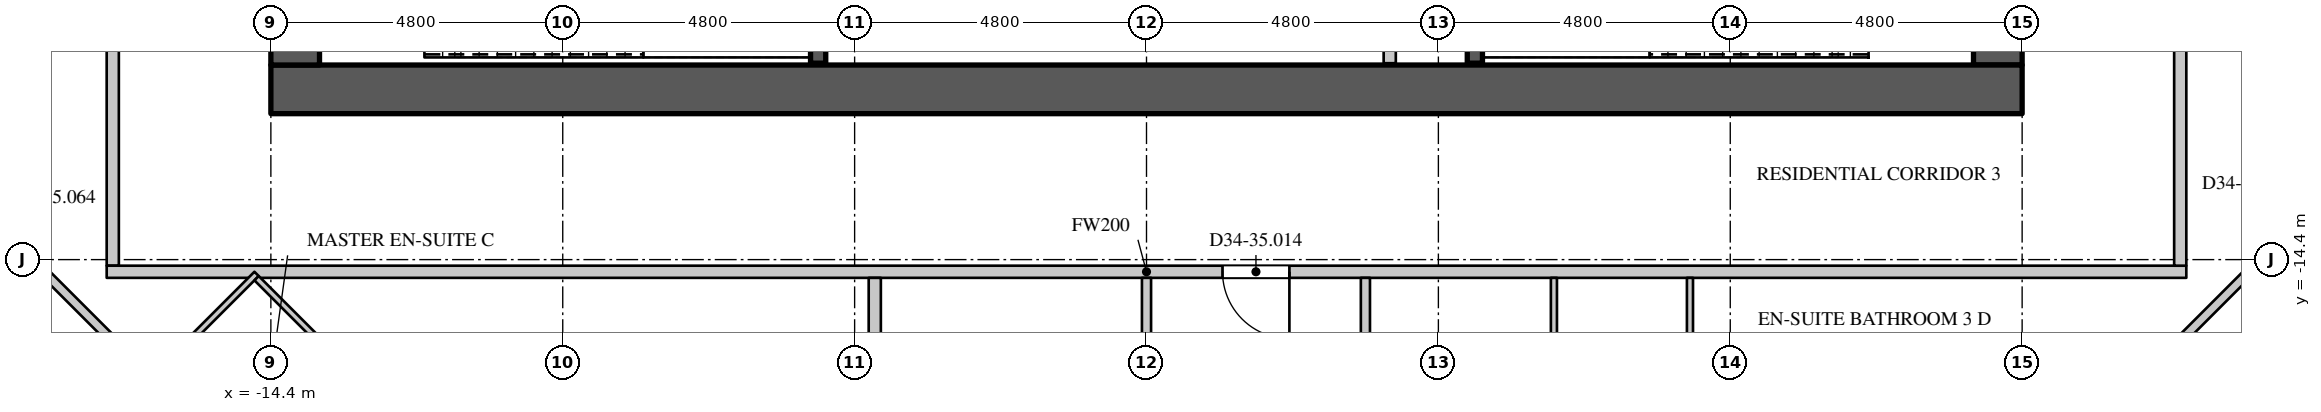
"""IFC4 building model, lengths in metres.
Left out: names, types, materials, properties, quantities, classifications, styles, units other than length and angle.
Written with IfcOpenShell. Run it as: python <this file> out.ifc"""

import sys

from ifc_helpers import new_model, si_unit, direction, frame, frame_2d, origin, place, context, subcontext, project, spatial, rectangle, extrude, element, fill, save


model = new_model("IFC4")
c1 = context("Model", 3, precision=1e-05, world=origin(), true_north=direction((0.0, 1.0)))
c2 = subcontext(c1, "Body", "Model", "MODEL_VIEW")
j1 = project(units=[si_unit("LENGTHUNIT", "METRE"), si_unit("PLANEANGLEUNIT", "RADIAN")], contexts=[c1])
p1 = place(None, origin())
s1 = spatial("IfcSite", under=j1, at=p1, CompositionType="ELEMENT")
p2 = place(p1, origin())
s2 = spatial("IfcBuilding", under=s1, at=p2, CompositionType="ELEMENT")
p3 = place(p2, frame((0.0, 0.0, 148.5)))
s3 = spatial("IfcBuildingStorey", under=s2, at=p3, CompositionType="ELEMENT", Elevation=148.5)
p4 = place(p3, frame((-14.4, -11.6, 0.0), z_axis=(0.0, 0.0, 1.0), x_axis=(1.0, 0.0, 0.0)))
e1 = element("IfcWall", 1, at=p4, inside=s3, PredefinedType="SHEAR", context=c2, shape_type="SweptSolid", body=[
    extrude(rectangle(XDim=28.8, YDim=0.8, at=frame_2d((14.4, 0.0))), origin(), (0.0, 0.0, 1.0), 4.2),
])
p5 = place(p3, frame((14.0, -11.2, 0.0), z_axis=(0.0, 0.0, 1.0), x_axis=(0.0, 1.0, 0.0)))
e2 = element("IfcWall", 2, at=p5, inside=s3, PredefinedType="SHEAR", context=c2, shape_type="SweptSolid", body=[
    extrude(rectangle(XDim=22.4, YDim=0.8, at=frame_2d((11.2, 0.0))), origin(), (0.0, 0.0, 1.0), 4.2),
])
p6 = place(p5, frame((20.25, 0.0, 0.0)))
e3 = element("IfcOpeningElement", 3, at=p6, cuts=e2, PredefinedType="OPENING", context=c2, shape_type="SweptSolid", body=[
    extrude(rectangle(XDim=1.1, YDim=2.2, at=frame_2d((0.55, 1.1))), frame((0.0, 0.41, 0.0), z_axis=(0.0, -1.0, 0.0), x_axis=(1.0, 0.0, 0.0)), (0.0, 0.0, 1.0), 0.82),
])
p7 = place(p5, frame((1.05, 0.0, 0.0)))
e4 = element("IfcOpeningElement", 4, at=p7, cuts=e2, PredefinedType="OPENING", context=c2, shape_type="SweptSolid", body=[
    extrude(rectangle(XDim=1.1, YDim=2.2, at=frame_2d((0.55, 1.1))), frame((0.0, 0.41, 0.0), z_axis=(0.0, -1.0, 0.0), x_axis=(1.0, 0.0, 0.0)), (0.0, 0.0, 1.0), 0.82),
])
p8 = place(p5, frame((14.75, 0.0, 0.0)))
e5 = element("IfcOpeningElement", 5, at=p8, cuts=e2, PredefinedType="OPENING", context=c2, shape_type="SweptSolid", body=[
    extrude(rectangle(XDim=1.5, YDim=2.4, at=frame_2d((0.75, 1.2))), frame((0.0, 0.41, 0.0), z_axis=(0.0, -1.0, 0.0), x_axis=(1.0, 0.0, 0.0)), (0.0, 0.0, 1.0), 0.82),
])
p9 = place(p5, frame((6.15, 0.0, 0.0)))
e6 = element("IfcOpeningElement", 6, at=p9, cuts=e2, PredefinedType="OPENING", context=c2, shape_type="SweptSolid", body=[
    extrude(rectangle(XDim=1.5, YDim=2.4, at=frame_2d((0.75, 1.2))), frame((0.0, 0.41, 0.0), z_axis=(0.0, -1.0, 0.0), x_axis=(1.0, 0.0, 0.0)), (0.0, 0.0, 1.0), 0.82),
])
p10 = place(p3, frame((-14.0, -11.2, 0.0), z_axis=(0.0, 0.0, 1.0), x_axis=(0.0, 1.0, 0.0)))
e7 = element("IfcWall", 7, at=p10, inside=s3, PredefinedType="SHEAR", context=c2, shape_type="SweptSolid", body=[
    extrude(rectangle(XDim=22.4, YDim=0.8, at=frame_2d((11.2, 0.0))), origin(), (0.0, 0.0, 1.0), 4.2),
])
p11 = place(p10, frame((20.25, 0.0, 0.0)))
e8 = element("IfcOpeningElement", 8, at=p11, cuts=e7, PredefinedType="OPENING", context=c2, shape_type="SweptSolid", body=[
    extrude(rectangle(XDim=1.1, YDim=2.2, at=frame_2d((0.55, 1.1))), frame((0.0, 0.41, 0.0), z_axis=(0.0, -1.0, 0.0), x_axis=(1.0, 0.0, 0.0)), (0.0, 0.0, 1.0), 0.82),
])
p12 = place(p10, frame((1.05, 0.0, 0.0)))
e9 = element("IfcOpeningElement", 9, at=p12, cuts=e7, PredefinedType="OPENING", context=c2, shape_type="SweptSolid", body=[
    extrude(rectangle(XDim=1.1, YDim=2.2, at=frame_2d((0.55, 1.1))), frame((0.0, 0.41, 0.0), z_axis=(0.0, -1.0, 0.0), x_axis=(1.0, 0.0, 0.0)), (0.0, 0.0, 1.0), 0.82),
])
p13 = place(p10, frame((15.95, 0.0, 0.0)))
e10 = element("IfcOpeningElement", 10, at=p13, cuts=e7, PredefinedType="OPENING", context=c2, shape_type="SweptSolid", body=[
    extrude(rectangle(XDim=1.5, YDim=2.4, at=frame_2d((0.75, 1.2))), frame((0.0, 0.41, 0.0), z_axis=(0.0, -1.0, 0.0), x_axis=(1.0, 0.0, 0.0)), (0.0, 0.0, 1.0), 0.82),
])
p14 = place(p10, frame((4.95, 0.0, 0.0)))
e11 = element("IfcOpeningElement", 11, at=p14, cuts=e7, PredefinedType="OPENING", context=c2, shape_type="SweptSolid", body=[
    extrude(rectangle(XDim=1.5, YDim=2.4, at=frame_2d((0.75, 1.2))), frame((0.0, 0.41, 0.0), z_axis=(0.0, -1.0, 0.0), x_axis=(1.0, 0.0, 0.0)), (0.0, 0.0, 1.0), 0.82),
])
p15 = place(p3, frame((-17.0, -14.5, 0.0), z_axis=(0.0, 0.0, 1.0), x_axis=(0.0, 1.0, 0.0)))
e12 = element("IfcWall", 12, at=p15, inside=s3, PredefinedType="PARTITIONING", context=c2, shape_type="SweptSolid", body=[
    extrude(rectangle(XDim=29.0, YDim=0.2, at=frame_2d((14.5, 0.0))), origin(), (0.0, 0.0, 1.0), 3.798),
])
p16 = place(p15, frame((13.9, 0.0, 0.0)))
e13 = element("IfcOpeningElement", 13, at=p16, cuts=e12, PredefinedType="OPENING", context=c2, shape_type="SweptSolid", body=[
    extrude(rectangle(XDim=1.1, YDim=2.4, at=frame_2d((0.55, 1.2))), frame((0.0, 0.11, 0.0), z_axis=(0.0, -1.0, 0.0), x_axis=(1.0, 0.0, 0.0)), (0.0, 0.0, 1.0), 0.22),
])
p17 = place(p3, frame((-17.1, -14.6, 0.0), z_axis=(0.0, 0.0, 1.0), x_axis=(1.0, 0.0, 0.0)))
e14 = element("IfcWall", 14, at=p17, inside=s3, PredefinedType="PARTITIONING", context=c2, shape_type="SweptSolid", body=[
    extrude(rectangle(XDim=34.2, YDim=0.2, at=frame_2d((17.1, 0.0))), origin(), (0.0, 0.0, 1.0), 3.798),
])
p18 = place(p17, frame((18.35, 0.0, 0.0)))
e15 = element("IfcOpeningElement", 15, at=p18, cuts=e14, PredefinedType="OPENING", context=c2, shape_type="SweptSolid", body=[
    extrude(rectangle(XDim=1.1, YDim=2.4, at=frame_2d((0.55, 1.2))), frame((0.0, 0.11, 0.0), z_axis=(0.0, -1.0, 0.0), x_axis=(1.0, 0.0, 0.0)), (0.0, 0.0, 1.0), 0.22),
])
p19 = place(p3, frame((17.0, -14.5, 0.0), z_axis=(0.0, 0.0, 1.0), x_axis=(0.0, 1.0, 0.0)))
e16 = element("IfcWall", 16, at=p19, inside=s3, PredefinedType="PARTITIONING", context=c2, shape_type="SweptSolid", body=[
    extrude(rectangle(XDim=29.0, YDim=0.2, at=frame_2d((14.5, 0.0))), origin(), (0.0, 0.0, 1.0), 3.798),
])
p20 = place(p19, frame((15.9, 0.0, 0.0)))
e17 = element("IfcOpeningElement", 17, at=p20, cuts=e16, PredefinedType="OPENING", context=c2, shape_type="SweptSolid", body=[
    extrude(rectangle(XDim=1.1, YDim=2.4, at=frame_2d((0.55, 1.2))), frame((0.0, 0.11, 0.0), z_axis=(0.0, -1.0, 0.0), x_axis=(1.0, 0.0, 0.0)), (0.0, 0.0, 1.0), 0.22),
])
p21 = place(p3, frame((-21.347, -11.388, 0.0), z_axis=(0.0, 0.0, 1.0), x_axis=(0.707106781187, -0.707106781187, 0.0)))
e18 = element("IfcWall", 18, at=p21, inside=s3, PredefinedType="PARTITIONING", context=c2, shape_type="SweptSolid", body=[
    extrude(rectangle(XDim=6.967, YDim=0.15, at=frame_2d((3.483, 0.0))), origin(), (0.0, 0.0, 1.0), 3.798),
])
p22 = place(p21, frame((2.75, 0.0, 0.0)))
e19 = element("IfcOpeningElement", 19, at=p22, cuts=e18, PredefinedType="OPENING", context=c2, shape_type="SweptSolid", body=[
    extrude(rectangle(XDim=0.95, YDim=2.2, at=frame_2d((0.475, 1.1))), frame((0.0, 0.085, 0.0), z_axis=(0.0, -1.0, 0.0), x_axis=(1.0, 0.0, 0.0)), (0.0, 0.0, 1.0), 0.17),
])
p23 = place(p3, frame((0.0, -26.455, 0.0), z_axis=(0.0, 0.0, 1.0), x_axis=(0.0, 1.0, 0.0)))
e20 = element("IfcWall", 20, at=p23, inside=s3, PredefinedType="PARTITIONING", context=c2, shape_type="SweptSolid", body=[
    extrude(rectangle(XDim=11.755, YDim=0.15, at=frame_2d((5.877, 0.0))), origin(), (0.0, 0.0, 1.0), 3.798),
])
p24 = place(p23, frame((8.3, 0.0, 0.0)))
e21 = element("IfcOpeningElement", 21, at=p24, cuts=e20, PredefinedType="OPENING", context=c2, shape_type="SweptSolid", body=[
    extrude(rectangle(XDim=0.95, YDim=2.2, at=frame_2d((0.475, 1.1))), frame((0.0, 0.085, 0.0), z_axis=(0.0, -1.0, 0.0), x_axis=(1.0, 0.0, 0.0)), (0.0, 0.0, 1.0), 0.17),
])
p25 = place(p3, frame((3.6, -20.725, 0.0), z_axis=(0.0, 0.0, 1.0), x_axis=(0.0, 1.0, 0.0)))
e22 = element("IfcWall", 22, at=p25, inside=s3, PredefinedType="PARTITIONING", context=c2, shape_type="SweptSolid", body=[
    extrude(rectangle(XDim=6.025, YDim=0.15, at=frame_2d((3.013, 0.0))), origin(), (0.0, 0.0, 1.0), 3.798),
])
p26 = place(p25, frame((2.55, 0.0, 0.0)))
e23 = element("IfcOpeningElement", 23, at=p26, cuts=e22, PredefinedType="OPENING", context=c2, shape_type="SweptSolid", body=[
    extrude(rectangle(XDim=0.95, YDim=2.2, at=frame_2d((0.475, 1.1))), frame((0.0, 0.085, 0.0), z_axis=(0.0, -1.0, 0.0), x_axis=(1.0, 0.0, 0.0)), (0.0, 0.0, 1.0), 0.17),
])
p27 = place(p3, frame((15.099, -17.636, 0.0), z_axis=(0.0, 0.0, 1.0), x_axis=(0.707106781187, 0.707106781187, 0.0)))
e24 = element("IfcWall", 24, at=p27, inside=s3, PredefinedType="PARTITIONING", context=c2, shape_type="SweptSolid", body=[
    extrude(rectangle(XDim=8.986, YDim=0.15, at=frame_2d((4.493, 0.0))), origin(), (0.0, 0.0, 1.0), 3.798),
])
p28 = place(p27, frame((0.4, 0.0, 0.0)))
e25 = element("IfcOpeningElement", 25, at=p28, cuts=e24, PredefinedType="OPENING", context=c2, shape_type="SweptSolid", body=[
    extrude(rectangle(XDim=0.95, YDim=2.2, at=frame_2d((0.475, 1.1))), frame((0.0, 0.085, 0.0), z_axis=(0.0, -1.0, 0.0), x_axis=(1.0, 0.0, 0.0)), (0.0, 0.0, 1.0), 0.17),
])
p29 = place(p27, frame((5.1, 0.0, 0.0)))
e26 = element("IfcOpeningElement", 26, at=p29, cuts=e24, PredefinedType="OPENING", context=c2, shape_type="SweptSolid", body=[
    extrude(rectangle(XDim=0.95, YDim=2.2, at=frame_2d((0.475, 1.1))), frame((0.0, 0.085, 0.0), z_axis=(0.0, -1.0, 0.0), x_axis=(1.0, 0.0, 0.0)), (0.0, 0.0, 1.0), 0.17),
])
p30 = place(p27, frame((7.85, 0.0, 0.0)))
e27 = element("IfcOpeningElement", 27, at=p30, cuts=e24, PredefinedType="OPENING", context=c2, shape_type="SweptSolid", body=[
    extrude(rectangle(XDim=0.95, YDim=2.2, at=frame_2d((0.475, 1.1))), frame((0.0, 0.085, 0.0), z_axis=(0.0, -1.0, 0.0), x_axis=(1.0, 0.0, 0.0)), (0.0, 0.0, 1.0), 0.17),
])
p31 = place(p3, frame((-4.469, -25.65, 0.0), z_axis=(0.0, 0.0, 1.0), x_axis=(0.0, 1.0, 0.0)))
e28 = element("IfcWall", 28, at=p31, inside=s3, PredefinedType="PARTITIONING", context=c2, shape_type="SweptSolid", body=[
    extrude(rectangle(XDim=10.95, YDim=0.2, at=frame_2d((5.475, 0.0))), origin(), (0.0, 0.0, 1.0), 3.15),
])
p32 = place(p3, frame((4.0, -11.17, 0.0), z_axis=(0.0, 0.0, 1.0), x_axis=(0.0, 1.0, 0.0)))
e29 = element("IfcWall", 29, at=p32, inside=s3, PredefinedType="PARTITIONING", context=c2, shape_type="SweptSolid", body=[
    extrude(rectangle(XDim=5.27, YDim=0.2, at=frame_2d((2.635, 0.0))), origin(), (0.0, 0.0, 1.0), 3.798),
])
for number, where, z_axis, x_axis in (
    (30, (-5.4, -11.17, 0.0), (0.0, 0.0, 1.0), (0.0, 1.0, 0.0)),
    (31, (5.4, -11.17, 0.0), (0.0, 0.0, 1.0), (0.0, 1.0, 0.0)),
):
    element("IfcWall", number, at=place(p3, frame(where, z_axis=z_axis, x_axis=x_axis)), inside=s3, PredefinedType="SHEAR", context=c2, shape_type="SweptSolid", body=[
        extrude(rectangle(XDim=2.845, YDim=0.25, at=frame_2d((1.422, 0.0))), origin(), (0.0, 0.0, 1.0), 3.798),
    ])
p33 = place(p3, frame((-15.929, -15.929, 0.0), z_axis=(0.0, 0.0, 1.0), x_axis=(0.707106781187, 0.707106781187, 0.0)))
e32 = element("IfcWall", 32, at=p33, inside=s3, PredefinedType="PARTITIONING", context=c2, shape_type="SweptSolid", body=[
    extrude(rectangle(XDim=1.83, YDim=0.1, at=frame_2d((0.915, 0.0))), origin(), (0.0, 0.0, 1.0), 3.798),
])
p34 = place(p3, frame((-14.635, -14.706, 0.0), z_axis=(0.0, 0.0, 1.0), x_axis=(0.707106781187, -0.707106781187, 0.0)))
e33 = element("IfcWall", 33, at=p34, inside=s3, PredefinedType="PARTITIONING", context=c2, shape_type="SweptSolid", body=[
    extrude(rectangle(XDim=2.6, YDim=0.1, at=frame_2d((1.3, 0.0))), origin(), (0.0, 0.0, 1.0), 3.798),
])
p35 = place(p3, frame((6.7, -20.725, 0.0), z_axis=(0.0, 0.0, 1.0), x_axis=(0.0, 1.0, 0.0)))
e34 = element("IfcWall", 34, at=p35, inside=s3, PredefinedType="PARTITIONING", context=c2, shape_type="SweptSolid", body=[
    extrude(rectangle(XDim=6.025, YDim=0.1, at=frame_2d((3.013, 0.0))), origin(), (0.0, 0.0, 1.0), 3.798),
])
p36 = place(p3, frame((8.937, -20.82, 0.0), z_axis=(0.0, 0.0, 1.0), x_axis=(0.0, 1.0, 0.0)))
e35 = element("IfcWall", 35, at=p36, inside=s3, PredefinedType="PARTITIONING", context=c2, shape_type="SweptSolid", body=[
    extrude(rectangle(XDim=6.12, YDim=0.1, at=frame_2d((3.06, 0.0))), origin(), (0.0, 0.0, 1.0), 3.798),
])
p37 = place(p36, frame((2.65, 0.0, 0.0)))
e36 = element("IfcOpeningElement", 36, at=p37, cuts=e35, PredefinedType="OPENING", context=c2, shape_type="SweptSolid", body=[
    extrude(rectangle(XDim=0.9, YDim=2.2, at=frame_2d((0.45, 1.1))), frame((0.0, 0.06, 0.0), z_axis=(0.0, -1.0, 0.0), x_axis=(1.0, 0.0, 0.0)), (0.0, 0.0, 1.0), 0.12),
])
p38 = place(p18, origin())
e37 = element("IfcDoor", 37, at=p38, inside=s3, OperationType="SINGLE_SWING_LEFT", PredefinedType="DOOR", context=c2, shape_type="SweptSolid", body=[
    extrude(rectangle(XDim=1.1, YDim=2.4, at=frame_2d((0.55, 1.2))), frame((0.0, 0.025, 0.0), z_axis=(0.0, -1.0, 0.0), x_axis=(1.0, 0.0, 0.0)), (0.0, 0.0, 1.0), 0.05),
])
fill(e15, e37)
save(model, sys.argv[1])
